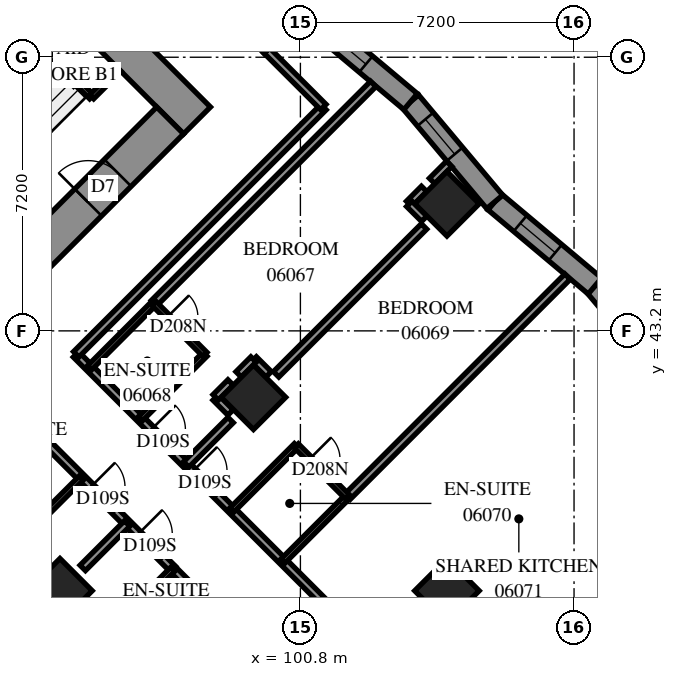
"""IFC4 building model, lengths in metres.
Left out: names, types, materials, properties, quantities, classifications, styles, units other than length and angle.
Written with IfcOpenShell. Run it as: python <this file> out.ifc"""

import sys

from ifc_helpers import new_model, si_unit, direction, frame, frame_2d, origin, origin_2d, place, context, subcontext, project, spatial, polyline, rectangle, outline, extrude, element, fill, save


model = new_model("IFC4")
c1 = context("Model", 3, precision=1e-05, world=origin(), true_north=direction((0.0, 1.0)))
c2 = subcontext(c1, "Body", "Model", "MODEL_VIEW")
j1 = project(units=[si_unit("LENGTHUNIT", "METRE"), si_unit("PLANEANGLEUNIT", "RADIAN")], contexts=[c1])
p1 = place(None, origin())
s1 = spatial("IfcSite", under=j1, at=p1, CompositionType="ELEMENT")
p2 = place(p1, origin())
s2 = spatial("IfcBuilding", under=s1, at=p2, CompositionType="ELEMENT")
p3 = place(p2, frame((0.0, 0.0, 27.0)))
s3 = spatial("IfcBuildingStorey", under=s2, at=p3, CompositionType="ELEMENT", Elevation=27.0)
for number, where, z_axis, x_axis in (
    (1, (104.656, 46.544, 0.0), (0.0, 0.0, 1.0), (0.707, -0.707, 0.0)),
    (2, (99.565, 41.453, 0.0), (0.0, 0.0, 1.0), (0.707, -0.707, 0.0)),
    (3, (94.474, 36.362, 0.0), (0.0, 0.0, 1.0), (0.707, -0.707, 0.0)),
    (4, (104.656, 36.362, 0.0), (0.0, 0.0, 1.0), (0.707, -0.707, 0.0)),
):
    element("IfcColumn", number, at=place(p3, frame(where, z_axis=z_axis, x_axis=x_axis)), inside=s3, PredefinedType="COLUMN", context=c2, shape_type="SweptSolid", body=[
        extrude(rectangle(XDim=1.2, YDim=1.2, at=origin_2d()), origin(), (0.0, 0.0, 1.0), 3.1),
    ])
p4 = place(p3, frame((86.483, 60.333, -0.3), z_axis=(0.0, 0.0, 1.0), x_axis=(0.70710983, -0.7071037324, 0.0)))
e5 = element("IfcWall", 5, at=p4, inside=s3, PredefinedType="SHEAR", context=c2, shape_type="SweptSolid", body=[
    extrude(rectangle(XDim=16.4, YDim=1.0, at=frame_2d((8.2, 0.0))), origin(), (0.0, 0.0, 1.0), 2.7),
])
p5 = place(p4, frame((11.0, 0.0, 0.3)))
e6 = element("IfcOpeningElement", 6, at=p5, cuts=e5, PredefinedType="OPENING", context=c2, shape_type="SweptSolid", body=[
    extrude(rectangle(XDim=0.8, YDim=2.1, at=frame_2d((0.4, 1.05))), frame((0.0, 0.51, 0.0), z_axis=(0.0, -1.0, 0.0), x_axis=(1.0, 0.0, 0.0)), (0.0, 0.0, 1.0), 1.02),
])
p6 = place(p3, frame((87.19, 38.554, -0.3), z_axis=(0.0, 0.0, 1.0), x_axis=(0.707103309, 0.7071102534, 0.0)))
e7 = element("IfcWall", 7, at=p6, inside=s3, PredefinedType="SHEAR", context=c2, shape_type="SweptSolid", body=[
    extrude(rectangle(XDim=14.4, YDim=1.0, at=frame_2d((7.2, 0.0))), origin(), (0.0, 0.0, 1.0), 2.7),
])
p7 = place(p6, frame((4.55, 0.0, 0.3)))
e8 = element("IfcOpeningElement", 8, at=p7, cuts=e7, PredefinedType="OPENING", context=c2, shape_type="SweptSolid", body=[
    extrude(rectangle(XDim=1.1, YDim=2.1, at=frame_2d((0.55, 1.05))), frame((0.0, 0.51, 0.0), z_axis=(0.0, -1.0, 0.0), x_axis=(1.0, 0.0, 0.0)), (0.0, 0.0, 1.0), 1.02),
])
p8 = place(p6, frame((11.35, 0.0, 0.3)))
e9 = element("IfcOpeningElement", 9, at=p8, cuts=e7, PredefinedType="OPENING", context=c2, shape_type="SweptSolid", body=[
    extrude(rectangle(XDim=1.1, YDim=2.1, at=frame_2d((0.55, 1.05))), frame((0.0, 0.51, 0.0), z_axis=(0.0, -1.0, 0.0), x_axis=(1.0, 0.0, 0.0)), (0.0, 0.0, 1.0), 1.02),
])
p9 = place(p3, frame((110.762, 41.744, 0.0), z_axis=(0.0, 0.0, 1.0), x_axis=(-0.6428036801, 0.7660309582, 0.0)))
e10 = element("IfcWall", 10, at=p9, inside=s3, PredefinedType="SOLIDWALL", context=c2, shape_type="SweptSolid", body=[
    extrude(outline(polyline([(0.024, -0.275), (3.466, -0.275), (3.418, 0.275), (-0.024, 0.275), (0.024, -0.275)])), origin(), (0.0, 0.0, 1.0), 3.1),
])
p10 = place(p9, frame((1.266, 0.0, 0.5)))
e11 = element("IfcOpeningElement", 11, at=p10, cuts=e10, PredefinedType="OPENING", context=c2, shape_type="SweptSolid", body=[
    extrude(rectangle(XDim=1.2, YDim=2.45, at=frame_2d((0.6, 1.225))), frame((0.0, 0.285, 0.0), z_axis=(0.0, -1.0, 0.0), x_axis=(1.0, 0.0, 0.0)), (0.0, 0.0, 1.0), 0.57),
])
p11 = place(p3, frame((108.549, 44.381, 0.0), z_axis=(0.0, 0.0, 1.0), x_axis=(-0.7660309582, 0.6428036801, 0.0)))
e12 = element("IfcWall", 12, at=p11, inside=s3, PredefinedType="SOLIDWALL", context=c2, shape_type="SweptSolid", body=[
    extrude(outline(polyline([(-0.024, -0.275), (3.418, -0.275), (3.466, 0.275), (0.024, 0.275), (-0.024, -0.275)])), origin(), (0.0, 0.0, 1.0), 3.1),
])
p12 = place(p11, frame((1.364, 0.0, 0.5)))
e13 = element("IfcOpeningElement", 13, at=p12, cuts=e12, PredefinedType="OPENING", context=c2, shape_type="SweptSolid", body=[
    extrude(rectangle(XDim=1.2, YDim=2.45, at=frame_2d((0.6, 1.225))), frame((0.0, 0.285, 0.0), z_axis=(0.0, -1.0, 0.0), x_axis=(1.0, 0.0, 0.0)), (0.0, 0.0, 1.0), 0.57),
])
p13 = place(p3, frame((105.912, 46.594, 0.0), z_axis=(0.0, 0.0, 1.0), x_axis=(-0.6427893761, 0.7660429609, 0.0)))
e14 = element("IfcWall", 14, at=p13, inside=s3, PredefinedType="SOLIDWALL", context=c2, shape_type="SweptSolid", body=[
    extrude(outline(polyline([(0.024, -0.275), (3.466, -0.275), (3.418, 0.275), (-0.024, 0.275), (0.024, -0.275)])), origin(), (0.0, 0.0, 1.0), 3.1),
])
p14 = place(p13, frame((1.637, 0.0, 0.5)))
e15 = element("IfcOpeningElement", 15, at=p14, cuts=e14, PredefinedType="OPENING", context=c2, shape_type="SweptSolid", body=[
    extrude(rectangle(XDim=1.2, YDim=2.45, at=frame_2d((0.6, 1.225))), frame((0.0, 0.285, 0.0), z_axis=(0.0, -1.0, 0.0), x_axis=(1.0, 0.0, 0.0)), (0.0, 0.0, 1.0), 0.57),
])
p15 = place(p3, frame((103.7, 49.231, 0.0), z_axis=(0.0, 0.0, 1.0), x_axis=(-0.7660429609, 0.6427893761, 0.0)))
e16 = element("IfcWall", 16, at=p15, inside=s3, PredefinedType="SOLIDWALL", context=c2, shape_type="SweptSolid", body=[
    extrude(outline(polyline([(-0.024, -0.275), (3.418, -0.275), (3.466, 0.275), (0.024, 0.275), (-0.024, -0.275)])), origin(), (0.0, 0.0, 1.0), 3.1),
])
p16 = place(p15, frame((1.535, 0.0, 0.5)))
e17 = element("IfcOpeningElement", 17, at=p16, cuts=e16, PredefinedType="OPENING", context=c2, shape_type="SweptSolid", body=[
    extrude(rectangle(XDim=1.2, YDim=2.45, at=frame_2d((0.6, 1.225))), frame((0.0, 0.285, 0.0), z_axis=(0.0, -1.0, 0.0), x_axis=(1.0, 0.0, 0.0)), (0.0, 0.0, 1.0), 0.57),
])
p17 = place(p3, frame((91.313, 53.354, 0.0), z_axis=(0.0, 0.0, 1.0), x_axis=(0.7071067812, -0.7071067812, 0.0)))
e18 = element("IfcWall", 18, at=p17, inside=s3, PredefinedType="PARTITIONING", context=c2, shape_type="SweptSolid", body=[
    extrude(rectangle(XDim=5.65, YDim=0.15, at=frame_2d((2.825, 0.0))), origin(), (0.0, 0.0, 1.0), 3.1),
])
p18 = place(p3, frame((95.308, 49.358, 0.0), z_axis=(0.0, 0.0, 1.0), x_axis=(0.70705776, 0.707155799, 0.0)))
e19 = element("IfcWall", 19, at=p18, inside=s3, PredefinedType="PARTITIONING", context=c2, shape_type="SweptSolid", body=[
    extrude(rectangle(XDim=1.02, YDim=0.15, at=frame_2d((0.51, 0.0))), origin(), (0.0, 0.0, 1.0), 3.1),
])
p19 = place(p3, frame((94.895, 42.581, 0.0), z_axis=(0.0, 0.0, 1.0), x_axis=(0.7071067812, -0.7071067812, 0.0)))
e20 = element("IfcWall", 20, at=p19, inside=s3, PredefinedType="PARTITIONING", context=c2, shape_type="SweptSolid", body=[
    extrude(rectangle(XDim=14.9, YDim=0.2, at=frame_2d((7.45, 0.0))), origin(), (0.0, 0.0, 1.0), 3.1),
])
p20 = place(p19, frame((2.8, 0.0, 0.0)))
e21 = element("IfcOpeningElement", 21, at=p20, cuts=e20, PredefinedType="OPENING", context=c2, shape_type="SweptSolid", body=[
    extrude(rectangle(XDim=0.9, YDim=2.1, at=frame_2d((0.45, 1.05))), frame((0.0, 0.11, 0.0), z_axis=(0.0, -1.0, 0.0), x_axis=(1.0, 0.0, 0.0)), (0.0, 0.0, 1.0), 0.22),
])
p21 = place(p19, frame((4.348, 0.0, 0.0)))
e22 = element("IfcOpeningElement", 22, at=p21, cuts=e20, PredefinedType="OPENING", context=c2, shape_type="SweptSolid", body=[
    extrude(rectangle(XDim=0.9, YDim=2.1, at=frame_2d((0.45, 1.05))), frame((0.0, 0.11, 0.0), z_axis=(0.0, -1.0, 0.0), x_axis=(1.0, 0.0, 0.0)), (0.0, 0.0, 1.0), 0.22),
])
p22 = place(p19, frame((10.073, 0.0, 0.0)))
e23 = element("IfcOpeningElement", 23, at=p22, cuts=e20, PredefinedType="OPENING", context=c2, shape_type="SweptSolid", body=[
    extrude(rectangle(XDim=1.0, YDim=2.1, at=frame_2d((0.5, 1.05))), frame((0.0, 0.11, 0.0), z_axis=(0.0, -1.0, 0.0), x_axis=(1.0, 0.0, 0.0)), (0.0, 0.0, 1.0), 0.22),
])
p23 = place(p3, frame((105.437, 32.045, 0.0), z_axis=(0.0, 0.0, 1.0), x_axis=(0.7070125995, 0.7072009503, 0.0)))
e24 = element("IfcWall", 24, at=p23, inside=s3, PredefinedType="PARTITIONING", context=c2, shape_type="SweptSolid", body=[
    extrude(rectangle(XDim=10.618, YDim=0.2, at=frame_2d((5.309, 0.0))), origin(), (0.0, 0.0, 1.0), 3.1),
])
p24 = place(p3, frame((94.901, 42.583, 0.0), z_axis=(0.0, 0.0, 1.0), x_axis=(0.7072154749, 0.7069980708, 0.0)))
e25 = element("IfcWall", 25, at=p24, inside=s3, PredefinedType="PARTITIONING", context=c2, shape_type="SweptSolid", body=[
    extrude(rectangle(XDim=9.2, YDim=0.2, at=frame_2d((4.6, 0.0))), origin(), (0.0, 0.0, 1.0), 3.1),
])
p25 = place(p3, frame((102.039, 38.837, 0.0), z_axis=(0.0, 0.0, 1.0), x_axis=(0.7071067812, 0.7071067812, 0.0)))
e26 = element("IfcWall", 26, at=p25, inside=s3, PredefinedType="PARTITIONING", context=c2, shape_type="SweptSolid", body=[
    extrude(rectangle(XDim=8.188, YDim=0.2, at=frame_2d((4.094, 0.0))), origin(), (0.0, 0.0, 1.0), 3.1),
])
p26 = place(p3, frame((96.947, 43.929, 0.0), z_axis=(0.0, 0.0, 1.0), x_axis=(0.7071067812, 0.7071067812, 0.0)))
e27 = element("IfcWall", 27, at=p26, inside=s3, PredefinedType="PARTITIONING", context=c2, shape_type="SweptSolid", body=[
    extrude(rectangle(XDim=8.159, YDim=0.2, at=frame_2d((4.079, 0.0))), origin(), (0.0, 0.0, 1.0), 3.1),
])
p27 = place(p3, frame((102.531, 31.833, 0.0), z_axis=(0.0, 0.0, 1.0), x_axis=(-0.7070095491, 0.7072039999, 0.0)))
e28 = element("IfcWall", 28, at=p27, inside=s3, PredefinedType="PARTITIONING", context=c2, shape_type="SweptSolid", body=[
    extrude(rectangle(XDim=7.2, YDim=0.2, at=frame_2d((3.6, 0.0))), origin(), (0.0, 0.0, 1.0), 3.1),
])
p28 = place(p27, frame((2.165, 0.0, 0.0)))
e29 = element("IfcOpeningElement", 29, at=p28, cuts=e28, PredefinedType="OPENING", context=c2, shape_type="SweptSolid", body=[
    extrude(rectangle(XDim=0.9, YDim=2.1, at=frame_2d((0.45, 1.05))), frame((0.0, 0.11, 0.0), z_axis=(0.0, -1.0, 0.0), x_axis=(1.0, 0.0, 0.0)), (0.0, 0.0, 1.0), 0.22),
])
p29 = place(p27, frame((0.4, 0.0, 0.0)))
e30 = element("IfcOpeningElement", 30, at=p29, cuts=e28, PredefinedType="OPENING", context=c2, shape_type="SweptSolid", body=[
    extrude(rectangle(XDim=0.9, YDim=2.1, at=frame_2d((0.45, 1.05))), frame((0.0, 0.11, 0.0), z_axis=(0.0, -1.0, 0.0), x_axis=(1.0, 0.0, 0.0)), (0.0, 0.0, 1.0), 0.22),
])
p30 = place(p3, frame((100.161, 42.057, 0.0), z_axis=(0.0, 0.0, 1.0), x_axis=(0.7072884866, 0.706925029, 0.0)))
e31 = element("IfcWall", 31, at=p30, inside=s3, PredefinedType="PARTITIONING", context=c2, shape_type="SweptSolid", body=[
    extrude(rectangle(XDim=5.503, YDim=0.2, at=frame_2d((2.751, 0.0))), origin(), (0.0, 0.0, 1.0), 3.1),
])
p31 = place(p3, frame((93.699, 40.679, 0.0), z_axis=(0.0, 0.0, 1.0), x_axis=(0.7071067812, -0.7071067812, 0.0)))
e32 = element("IfcWall", 32, at=p31, inside=s3, PredefinedType="PARTITIONING", context=c2, shape_type="SweptSolid", body=[
    extrude(rectangle(XDim=5.301, YDim=0.2, at=frame_2d((2.65, 0.0))), origin(), (0.0, 0.0, 1.0), 3.1),
])
p32 = place(p31, frame((2.242, 0.0, 0.0)))
e33 = element("IfcOpeningElement", 33, at=p32, cuts=e32, PredefinedType="OPENING", context=c2, shape_type="SweptSolid", body=[
    extrude(rectangle(XDim=0.9, YDim=2.1, at=frame_2d((0.45, 1.05))), frame((0.0, 0.11, 0.0), z_axis=(0.0, -1.0, 0.0), x_axis=(1.0, 0.0, 0.0)), (0.0, 0.0, 1.0), 0.22),
])
p33 = place(p31, frame((4.002, 0.0, 0.0)))
e34 = element("IfcOpeningElement", 34, at=p33, cuts=e32, PredefinedType="OPENING", context=c2, shape_type="SweptSolid", body=[
    extrude(rectangle(XDim=0.9, YDim=2.1, at=frame_2d((0.45, 1.05))), frame((0.0, 0.11, 0.0), z_axis=(0.0, -1.0, 0.0), x_axis=(1.0, 0.0, 0.0)), (0.0, 0.0, 1.0), 0.22),
])
for number, where, z_axis, x_axis in (
    (35, (93.341, 37.635, 0.0), (0.0, 0.0, 1.0), (0.707, 0.707, 0.0)),
    (36, (95.745, 35.231, 0.0), (0.0, 0.0, 1.0), (0.707, 0.707, 0.0)),
):
    element("IfcWall", number, at=place(p3, frame(where, z_axis=z_axis, x_axis=x_axis)), inside=s3, PredefinedType="PARTITIONING", context=c2, shape_type="SweptSolid", body=[
        extrude(rectangle(XDim=2.401, YDim=0.15, at=frame_2d((1.201, 0.0))), origin(), (0.0, 0.0, 1.0), 3.1),
    ])
for number, where, z_axis, x_axis in (
    (37, (100.34, 37.142, 0.0), (0.0, 0.0, 1.0), (0.708, 0.707, 0.0)),
    (38, (96.592, 40.89, 0.0), (0.0, 0.0, 1.0), (0.708, 0.707, 0.0)),
    (39, (98.996, 38.486, 0.0), (0.0, 0.0, 1.0), (0.708, 0.707, 0.0)),
    (40, (95.252, 42.23, 0.0), (0.0, 0.0, 1.0), (0.707, 0.708, 0.0)),
):
    element("IfcWall", number, at=place(p3, frame(where, z_axis=z_axis, x_axis=x_axis)), inside=s3, PredefinedType="PARTITIONING", context=c2, shape_type="SweptSolid", body=[
        extrude(rectangle(XDim=2.4, YDim=0.15, at=frame_2d((1.2, 0.0))), origin(), (0.0, 0.0, 1.0), 3.1),
    ])
p34 = place(p3, frame((99.918, 50.574, 0.0), z_axis=(0.0, 0.0, 1.0), x_axis=(0.7075827869, -0.7066304548, 0.0)))
e41 = element("IfcWall", 41, at=p34, inside=s3, PredefinedType="PARTITIONING", context=c2, shape_type="SweptSolid", body=[
    extrude(rectangle(XDim=2.1, YDim=0.2, at=frame_2d((1.05, 0.0))), origin(), (0.0, 0.0, 1.0), 3.1),
])
p35 = place(p3, frame((96.945, 43.925, 0.0), z_axis=(0.0, 0.0, 1.0), x_axis=(0.7071067812, -0.7071067812, 0.0)))
e42 = element("IfcWall", 42, at=p35, inside=s3, PredefinedType="PARTITIONING", context=c2, shape_type="SweptSolid", body=[
    extrude(rectangle(XDim=1.901, YDim=0.15, at=frame_2d((0.95, 0.0))), origin(), (0.0, 0.0, 1.0), 3.1),
])
p36 = place(p35, frame((0.505, 0.0, 0.0)))
e43 = element("IfcOpeningElement", 43, at=p36, cuts=e42, PredefinedType="OPENING", context=c2, shape_type="SweptSolid", body=[
    extrude(rectangle(XDim=0.8, YDim=2.1, at=frame_2d((0.4, 1.05))), frame((0.0, 0.085, 0.0), z_axis=(0.0, -1.0, 0.0), x_axis=(1.0, 0.0, 0.0)), (0.0, 0.0, 1.0), 0.17),
])
p37 = place(p3, frame((100.693, 40.177, 0.0), z_axis=(0.0, 0.0, 1.0), x_axis=(0.7071067812, -0.7071067812, 0.0)))
e44 = element("IfcWall", 44, at=p37, inside=s3, PredefinedType="PARTITIONING", context=c2, shape_type="SweptSolid", body=[
    extrude(rectangle(XDim=1.901, YDim=0.15, at=frame_2d((0.95, 0.0))), origin(), (0.0, 0.0, 1.0), 3.1),
])
p38 = place(p37, frame((0.493, 0.0, 0.0)))
e45 = element("IfcOpeningElement", 45, at=p38, cuts=e44, PredefinedType="OPENING", context=c2, shape_type="SweptSolid", body=[
    extrude(rectangle(XDim=0.8, YDim=2.1, at=frame_2d((0.4, 1.05))), frame((0.0, 0.085, 0.0), z_axis=(0.0, -1.0, 0.0), x_axis=(1.0, 0.0, 0.0)), (0.0, 0.0, 1.0), 0.17),
])
for number, where, z_axis, x_axis in (
    (46, (97.796, 39.686, 0.0), (0.0, 0.0, 1.0), (0.707, 0.707, 0.0)),
    (47, (95.073, 36.963, 0.0), (0.0, 0.0, 1.0), (0.707, 0.707, 0.0)),
):
    element("IfcWall", number, at=place(p3, frame(where, z_axis=z_axis, x_axis=x_axis)), inside=s3, PredefinedType="PARTITIONING", context=c2, shape_type="SweptSolid", body=[
        extrude(rectangle(XDim=1.652, YDim=0.2, at=frame_2d((0.826, 0.0))), origin(), (0.0, 0.0, 1.0), 3.1),
    ])
p39 = place(p3, frame((99.453, 51.033, 0.0), z_axis=(0.0, 0.0, 1.0), x_axis=(0.7071067812, -0.7071067812, 0.0)))
e48 = element("IfcWall", 48, at=p39, inside=s3, PredefinedType="PARTITIONING", context=c2, shape_type="SweptSolid", body=[
    extrude(rectangle(XDim=0.653, YDim=0.2, at=frame_2d((0.327, 0.0))), origin(), (0.0, 0.0, 1.0), 3.1),
])
p40 = place(p3, frame((104.265, 47.145, 0.0), z_axis=(0.0, 0.0, 1.0), x_axis=(0.7071067812, 0.7071067812, 0.0)))
e49 = element("IfcWall", 49, at=p40, inside=s3, PredefinedType="PARTITIONING", context=c2, shape_type="SweptSolid", body=[
    extrude(rectangle(XDim=0.635, YDim=0.2, at=frame_2d((0.318, 0.0))), origin(), (0.0, 0.0, 1.0), 3.1),
])
p41 = place(p3, frame((103.661, 46.541, 0.0), z_axis=(0.0, 0.0, 1.0), x_axis=(0.7071067812, 0.7071067812, 0.0)))
e50 = element("IfcWall", 50, at=p41, inside=s3, PredefinedType="PARTITIONING", context=c2, shape_type="SweptSolid", body=[
    extrude(rectangle(XDim=0.557, YDim=0.2, at=frame_2d((0.279, 0.0))), origin(), (0.0, 0.0, 1.0), 3.1),
])
for number, where, z_axis, x_axis in (
    (51, (98.57, 41.448, 0.0), (0.0, 0.0, 1.0), (0.705, -0.709, 0.0)),
    (52, (99.571, 42.449, 0.0), (0.0, 0.0, 1.0), (0.709, -0.705, 0.0)),
    (53, (103.665, 46.543, 0.0), (0.0, 0.0, 1.0), (0.709, -0.705, 0.0)),
):
    element("IfcWall", number, at=place(p3, frame(where, z_axis=z_axis, x_axis=x_axis)), inside=s3, PredefinedType="PARTITIONING", context=c2, shape_type="SweptSolid", body=[
        extrude(rectangle(XDim=0.556, YDim=0.2, at=frame_2d((0.278, 0.0))), origin(), (0.0, 0.0, 1.0), 3.1),
    ])
for number, where, z_axis, x_axis in (
    (54, (98.571, 41.451, 0.0), (0.0, 0.0, 1.0), (0.707, 0.707, 0.0)),
    (55, (99.175, 42.055, 0.0), (0.0, 0.0, 1.0), (0.707, 0.707, 0.0)),
):
    element("IfcWall", number, at=place(p3, frame(where, z_axis=z_axis, x_axis=x_axis)), inside=s3, PredefinedType="PARTITIONING", context=c2, shape_type="SweptSolid", body=[
        extrude(rectangle(XDim=0.554, YDim=0.2, at=frame_2d((0.277, 0.0))), origin(), (0.0, 0.0, 1.0), 3.1),
    ])
p42 = place(p12, origin())
e56 = element("IfcWindow", 56, at=p42, inside=s3, PartitioningType="SINGLE_PANEL", PredefinedType="WINDOW", context=c2, shape_type="SweptSolid", body=[
    extrude(rectangle(XDim=1.2, YDim=2.45, at=frame_2d((0.6, 1.225))), frame((0.0, 0.155, 0.0), z_axis=(0.0, -1.0, 0.0), x_axis=(1.0, 0.0, 0.0)), (0.0, 0.0, 1.0), 0.06),
])
fill(e13, e56)
p43 = place(p14, origin())
e57 = element("IfcWindow", 57, at=p43, inside=s3, PartitioningType="SINGLE_PANEL", PredefinedType="WINDOW", context=c2, shape_type="SweptSolid", body=[
    extrude(rectangle(XDim=1.2, YDim=2.45, at=frame_2d((0.6, 1.225))), frame((0.0, 0.155, 0.0), z_axis=(0.0, -1.0, 0.0), x_axis=(1.0, 0.0, 0.0)), (0.0, 0.0, 1.0), 0.06),
])
fill(e15, e57)
p44 = place(p16, origin())
e58 = element("IfcWindow", 58, at=p44, inside=s3, PartitioningType="SINGLE_PANEL", PredefinedType="WINDOW", context=c2, shape_type="SweptSolid", body=[
    extrude(rectangle(XDim=1.2, YDim=2.45, at=frame_2d((0.6, 1.225))), frame((0.0, 0.155, 0.0), z_axis=(0.0, -1.0, 0.0), x_axis=(1.0, 0.0, 0.0)), (0.0, 0.0, 1.0), 0.06),
])
fill(e17, e58)
p45 = place(p8, origin())
e59 = element("IfcDoor", 59, at=p45, inside=s3, OperationType="SINGLE_SWING_RIGHT", PredefinedType="DOOR", context=c2, shape_type="SweptSolid", body=[
    extrude(rectangle(XDim=1.1, YDim=2.1, at=frame_2d((0.55, 1.05))), frame((0.0, 0.025, 0.0), z_axis=(0.0, -1.0, 0.0), x_axis=(1.0, 0.0, 0.0)), (0.0, 0.0, 1.0), 0.05),
])
fill(e9, e59)
p46 = place(p20, origin())
e60 = element("IfcDoor", 60, at=p46, inside=s3, OperationType="SINGLE_SWING_RIGHT", PredefinedType="DOOR", context=c2, shape_type="SweptSolid", body=[
    extrude(rectangle(XDim=0.9, YDim=2.1, at=frame_2d((0.45, 1.05))), frame((0.0, 0.025, 0.0), z_axis=(0.0, -1.0, 0.0), x_axis=(1.0, 0.0, 0.0)), (0.0, 0.0, 1.0), 0.05),
])
fill(e21, e60)
p47 = place(p36, origin())
e61 = element("IfcDoor", 61, at=p47, inside=s3, OperationType="SINGLE_SWING_RIGHT", PredefinedType="DOOR", context=c2, shape_type="SweptSolid", body=[
    extrude(rectangle(XDim=0.8, YDim=2.1, at=frame_2d((0.4, 1.05))), frame((0.0, 0.025, 0.0), z_axis=(0.0, -1.0, 0.0), x_axis=(1.0, 0.0, 0.0)), (0.0, 0.0, 1.0), 0.05),
])
fill(e43, e61)
p48 = place(p21, origin())
e62 = element("IfcDoor", 62, at=p48, inside=s3, OperationType="SINGLE_SWING_LEFT", PredefinedType="DOOR", context=c2, shape_type="SweptSolid", body=[
    extrude(rectangle(XDim=0.9, YDim=2.1, at=frame_2d((0.45, 1.05))), frame((0.0, 0.025, 0.0), z_axis=(0.0, -1.0, 0.0), x_axis=(1.0, 0.0, 0.0)), (0.0, 0.0, 1.0), 0.05),
])
fill(e22, e62)
p49 = place(p38, origin())
e63 = element("IfcDoor", 63, at=p49, inside=s3, OperationType="SINGLE_SWING_RIGHT", PredefinedType="DOOR", context=c2, shape_type="SweptSolid", body=[
    extrude(rectangle(XDim=0.8, YDim=2.1, at=frame_2d((0.4, 1.05))), frame((0.0, 0.025, 0.0), z_axis=(0.0, -1.0, 0.0), x_axis=(1.0, 0.0, 0.0)), (0.0, 0.0, 1.0), 0.05),
])
fill(e45, e63)
p50 = place(p32, origin())
e64 = element("IfcDoor", 64, at=p50, inside=s3, OperationType="SINGLE_SWING_LEFT", PredefinedType="DOOR", context=c2, shape_type="SweptSolid", body=[
    extrude(rectangle(XDim=0.9, YDim=2.1, at=frame_2d((0.45, 1.05))), frame((0.0, 0.025, 0.0), z_axis=(0.0, -1.0, 0.0), x_axis=(1.0, 0.0, 0.0)), (0.0, 0.0, 1.0), 0.05),
])
fill(e33, e64)
p51 = place(p33, origin())
e65 = element("IfcDoor", 65, at=p51, inside=s3, OperationType="SINGLE_SWING_RIGHT", PredefinedType="DOOR", context=c2, shape_type="SweptSolid", body=[
    extrude(rectangle(XDim=0.9, YDim=2.1, at=frame_2d((0.45, 1.05))), frame((0.0, 0.025, 0.0), z_axis=(0.0, -1.0, 0.0), x_axis=(1.0, 0.0, 0.0)), (0.0, 0.0, 1.0), 0.05),
])
fill(e34, e65)
save(model, sys.argv[1])
